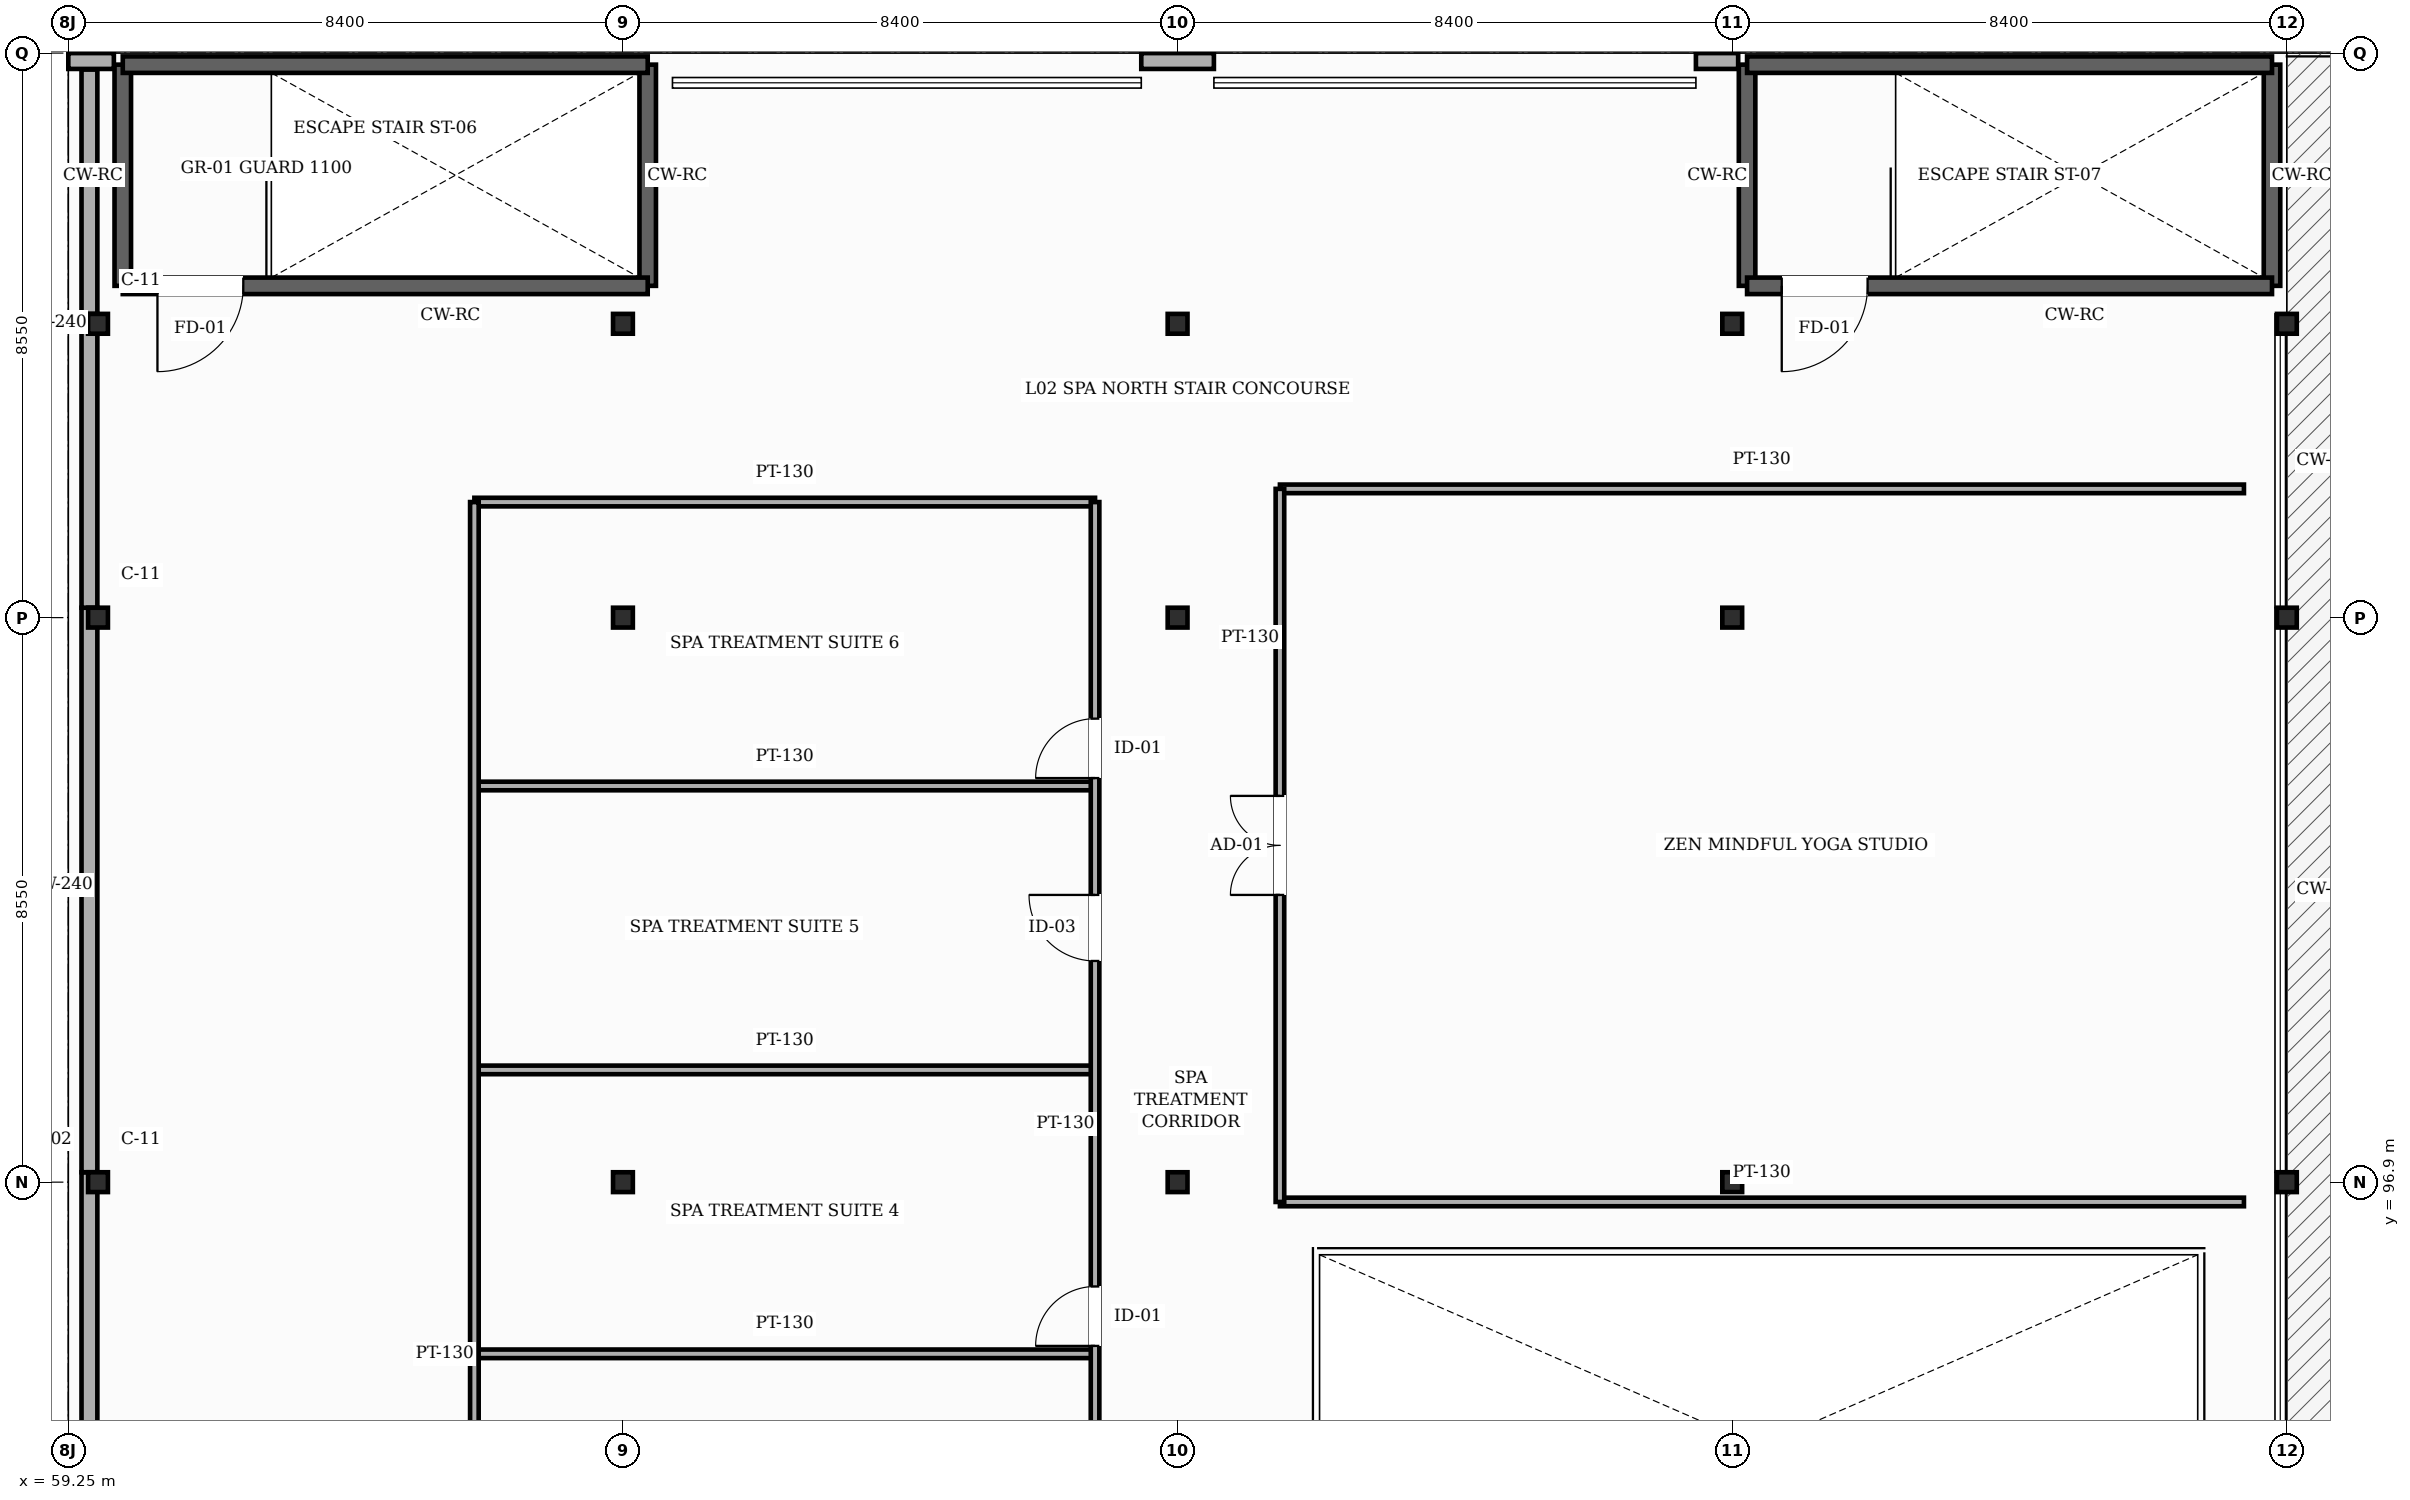
"""IFC4 building model, lengths in metres.
Left out: names, types, materials, properties, quantities, classifications, styles, units other than length and angle.
Written with IfcOpenShell. Run it as: python <this file> out.ifc"""

import sys

from ifc_helpers import new_model, si_unit, direction, frame, frame_2d, origin, origin_2d, place, context, subcontext, project, spatial, rectangle, i_section, extrude, element, fill, save


model = new_model("IFC4")
c1 = context("Model", 3, precision=1e-05, world=origin(), true_north=direction((0.0, 1.0)))
c2 = subcontext(c1, "Body", "Model", "MODEL_VIEW")
j1 = project(units=[si_unit("LENGTHUNIT", "METRE"), si_unit("PLANEANGLEUNIT", "RADIAN")], contexts=[c1])
p1 = place(None, origin())
s1 = spatial("IfcSite", under=j1, at=p1, CompositionType="ELEMENT")
p2 = place(p1, origin())
s2 = spatial("IfcBuilding", under=s1, at=p2, CompositionType="ELEMENT")
p3 = place(p2, frame((0.0, 0.0, 10.2)))
s3 = spatial("IfcBuildingStorey", under=s2, at=p3, CompositionType="ELEMENT", Elevation=10.2)
for number, where, z_axis, x_axis in (
    (1, (59.7, 96.9, 0.0), (0.0, 0.0, 1.0), (1.0, 0.0, 0.0)),
    (2, (59.7, 105.45, 0.0), (0.0, 0.0, 1.0), (1.0, 0.0, 0.0)),
    (3, (59.7, 109.9, 0.0), (0.0, 0.0, 1.0), (1.0, 0.0, 0.0)),
    (4, (67.65, 96.9, 0.0), (0.0, 0.0, 1.0), (1.0, 0.0, 0.0)),
    (5, (67.65, 105.45, 0.0), (0.0, 0.0, 1.0), (1.0, 0.0, 0.0)),
    (6, (67.65, 109.9, 0.0), (0.0, 0.0, 1.0), (1.0, 0.0, 0.0)),
    (7, (76.05, 96.9, 0.0), (0.0, 0.0, 1.0), (1.0, 0.0, 0.0)),
    (8, (76.05, 105.45, 0.0), (0.0, 0.0, 1.0), (1.0, 0.0, 0.0)),
    (9, (76.05, 109.9, 0.0), (0.0, 0.0, 1.0), (1.0, 0.0, 0.0)),
    (10, (84.45, 96.9, 0.0), (0.0, 0.0, 1.0), (1.0, 0.0, 0.0)),
    (11, (84.45, 105.45, 0.0), (0.0, 0.0, 1.0), (1.0, 0.0, 0.0)),
    (12, (84.45, 109.9, 0.0), (0.0, 0.0, 1.0), (1.0, 0.0, 0.0)),
    (13, (92.85, 96.9, 0.0), (0.0, 0.0, 1.0), (1.0, 0.0, 0.0)),
    (14, (92.85, 105.45, 0.0), (0.0, 0.0, 1.0), (1.0, 0.0, 0.0)),
    (15, (92.85, 109.9, 0.0), (0.0, 0.0, 1.0), (1.0, 0.0, 0.0)),
):
    element("IfcColumn", number, at=place(p3, frame(where, z_axis=z_axis, x_axis=x_axis)), inside=s3, PredefinedType="COLUMN", context=c2, shape_type="SweptSolid", body=[
        extrude(i_section(OverallWidth=0.3, OverallDepth=0.3, WebThickness=0.01, FlangeThickness=0.015, FilletRadius=0.013, at=origin_2d()), origin(), (0.0, 0.0, 1.0), 4.8),
    ])
p4 = place(p3, frame((59.25, 113.88, 0.0), z_axis=(0.0, 0.0, 1.0), x_axis=(1.0, 0.0, 0.0)))
e16 = element("IfcWall", 16, at=p4, inside=s3, PredefinedType="SOLIDWALL", context=c2, shape_type="SweptSolid", body=[
    extrude(rectangle(XDim=0.69, YDim=0.24, at=frame_2d((0.345, 0.0))), origin(), (0.0, 0.0, 1.0), 4.545),
])
p5 = place(p3, frame((75.5, 113.88, 0.0), z_axis=(0.0, 0.0, 1.0), x_axis=(1.0, 0.0, 0.0)))
e17 = element("IfcWall", 17, at=p5, inside=s3, PredefinedType="SOLIDWALL", context=c2, shape_type="SweptSolid", body=[
    extrude(rectangle(XDim=1.1, YDim=0.24, at=frame_2d((0.55, 0.0))), origin(), (0.0, 0.0, 1.0), 4.545),
])
p6 = place(p3, frame((83.9, 113.88, 0.0), z_axis=(0.0, 0.0, 1.0), x_axis=(1.0, 0.0, 0.0)))
e18 = element("IfcWall", 18, at=p6, inside=s3, PredefinedType="SOLIDWALL", context=c2, shape_type="SweptSolid", body=[
    extrude(rectangle(XDim=0.64, YDim=0.24, at=frame_2d((0.32, 0.0))), origin(), (0.0, 0.0, 1.0), 4.545),
])
p7 = place(p3, frame((59.57, 89.05, 0.0), z_axis=(0.0, 0.0, 1.0), x_axis=(0.0, 1.0, 0.0)))
e19 = element("IfcWall", 19, at=p7, inside=s3, PredefinedType="SOLIDWALL", context=c2, shape_type="SweptSolid", body=[
    extrude(rectangle(XDim=8.0, YDim=0.24, at=frame_2d((4.0, 0.0))), origin(), (0.0, 0.0, 1.0), 4.545),
])
p8 = place(p3, frame((59.57, 97.05, 0.0), z_axis=(0.0, 0.0, 1.0), x_axis=(0.0, 1.0, 0.0)))
e20 = element("IfcWall", 20, at=p8, inside=s3, PredefinedType="SOLIDWALL", context=c2, shape_type="SweptSolid", body=[
    extrude(rectangle(XDim=8.55, YDim=0.24, at=frame_2d((4.275, 0.0))), origin(), (0.0, 0.0, 1.0), 4.545),
])
p9 = place(p3, frame((59.57, 105.6, 0.0), z_axis=(0.0, 0.0, 1.0), x_axis=(0.0, 1.0, 0.0)))
e21 = element("IfcWall", 21, at=p9, inside=s3, PredefinedType="SOLIDWALL", context=c2, shape_type="SweptSolid", body=[
    extrude(rectangle(XDim=4.45, YDim=0.24, at=frame_2d((2.225, 0.0))), origin(), (0.0, 0.0, 1.0), 4.545),
])
p10 = place(p3, frame((59.57, 110.05, 0.0), z_axis=(0.0, 0.0, 1.0), x_axis=(0.0, 1.0, 0.0)))
e22 = element("IfcWall", 22, at=p10, inside=s3, PredefinedType="SOLIDWALL", context=c2, shape_type="SweptSolid", body=[
    extrude(rectangle(XDim=3.7, YDim=0.24, at=frame_2d((1.85, 0.0))), origin(), (0.0, 0.0, 1.0), 4.545),
])
for number, where, z_axis, x_axis in (
    (23, (60.075, 110.475, 0.0), (0.0, 0.0, 1.0), (0.0, 1.0, 0.0)),
    (24, (68.025, 113.825, 0.0), (0.0, 0.0, 1.0), (0.0, -1.0, 0.0)),
):
    element("IfcWall", number, at=place(p3, frame(where, z_axis=z_axis, x_axis=x_axis)), inside=s3, PredefinedType="SHEAR", context=c2, shape_type="SweptSolid", body=[
        extrude(rectangle(XDim=3.35, YDim=0.25, at=frame_2d((1.675, 0.0))), origin(), (0.0, 0.0, 1.0), 4.56),
    ])
p11 = place(p3, frame((68.025, 110.475, 0.0), z_axis=(0.0, 0.0, 1.0), x_axis=(-1.0, 0.0, 0.0)))
e25 = element("IfcWall", 25, at=p11, inside=s3, PredefinedType="SHEAR", context=c2, shape_type="SweptSolid", body=[
    extrude(rectangle(XDim=7.95, YDim=0.25, at=frame_2d((3.975, 0.0))), origin(), (0.0, 0.0, 1.0), 4.56),
])
p12 = place(p11, frame((6.125, 0.0, 0.0)))
e26 = element("IfcOpeningElement", 26, at=p12, cuts=e25, PredefinedType="OPENING", context=c2, shape_type="SweptSolid", body=[
    extrude(rectangle(XDim=1.3, YDim=2.2, at=frame_2d((0.65, 1.1))), frame((0.0, 0.135, 0.0), z_axis=(0.0, -1.0, 0.0), x_axis=(1.0, 0.0, 0.0)), (0.0, 0.0, 1.0), 0.27),
])
p13 = place(p3, frame((60.075, 113.825, 0.0), z_axis=(0.0, 0.0, 1.0), x_axis=(1.0, 0.0, 0.0)))
e27 = element("IfcWall", 27, at=p13, inside=s3, PredefinedType="SHEAR", context=c2, shape_type="SweptSolid", body=[
    extrude(rectangle(XDim=7.95, YDim=0.25, at=frame_2d((3.975, 0.0))), origin(), (0.0, 0.0, 1.0), 4.56),
])
for number, where, z_axis, x_axis in (
    (28, (84.675, 110.475, 0.0), (0.0, 0.0, 1.0), (0.0, 1.0, 0.0)),
    (29, (92.625, 113.825, 0.0), (0.0, 0.0, 1.0), (0.0, -1.0, 0.0)),
):
    element("IfcWall", number, at=place(p3, frame(where, z_axis=z_axis, x_axis=x_axis)), inside=s3, PredefinedType="SHEAR", context=c2, shape_type="SweptSolid", body=[
        extrude(rectangle(XDim=3.35, YDim=0.25, at=frame_2d((1.675, 0.0))), origin(), (0.0, 0.0, 1.0), 4.56),
    ])
p14 = place(p3, frame((92.625, 110.475, 0.0), z_axis=(0.0, 0.0, 1.0), x_axis=(-1.0, 0.0, 0.0)))
e30 = element("IfcWall", 30, at=p14, inside=s3, PredefinedType="SHEAR", context=c2, shape_type="SweptSolid", body=[
    extrude(rectangle(XDim=7.95, YDim=0.25, at=frame_2d((3.975, 0.0))), origin(), (0.0, 0.0, 1.0), 4.56),
])
p15 = place(p14, frame((6.125, 0.0, 0.0)))
e31 = element("IfcOpeningElement", 31, at=p15, cuts=e30, PredefinedType="OPENING", context=c2, shape_type="SweptSolid", body=[
    extrude(rectangle(XDim=1.3, YDim=2.2, at=frame_2d((0.65, 1.1))), frame((0.0, 0.135, 0.0), z_axis=(0.0, -1.0, 0.0), x_axis=(1.0, 0.0, 0.0)), (0.0, 0.0, 1.0), 0.27),
])
p16 = place(p3, frame((84.675, 113.825, 0.0), z_axis=(0.0, 0.0, 1.0), x_axis=(1.0, 0.0, 0.0)))
e32 = element("IfcWall", 32, at=p16, inside=s3, PredefinedType="SHEAR", context=c2, shape_type="SweptSolid", body=[
    extrude(rectangle(XDim=7.95, YDim=0.25, at=frame_2d((3.975, 0.0))), origin(), (0.0, 0.0, 1.0), 4.56),
])
p17 = place(p3, frame((65.4, 94.3, 0.0), z_axis=(0.0, 0.0, 1.0), x_axis=(1.0, 0.0, 0.0)))
e33 = element("IfcWall", 33, at=p17, inside=s3, PredefinedType="PARTITIONING", context=c2, shape_type="SweptSolid", body=[
    extrude(rectangle(XDim=9.4, YDim=0.13, at=frame_2d((4.7, 0.0))), origin(), (0.0, 0.0, 1.0), 4.545),
])
p18 = place(p3, frame((77.6, 96.6, 0.0), z_axis=(0.0, 0.0, 1.0), x_axis=(1.0, 0.0, 0.0)))
e34 = element("IfcWall", 34, at=p18, inside=s3, PredefinedType="PARTITIONING", context=c2, shape_type="SweptSolid", body=[
    extrude(rectangle(XDim=14.6, YDim=0.13, at=frame_2d((7.3, 0.0))), origin(), (0.0, 0.0, 1.0), 4.545),
])
for number, where, z_axis, x_axis in (
    (35, (65.4, 98.6, 0.0), (0.0, 0.0, 1.0), (1.0, 0.0, 0.0)),
    (36, (65.4, 102.9, 0.0), (0.0, 0.0, 1.0), (1.0, 0.0, 0.0)),
    (37, (65.4, 107.2, 0.0), (0.0, 0.0, 1.0), (1.0, 0.0, 0.0)),
):
    element("IfcWall", number, at=place(p3, frame(where, z_axis=z_axis, x_axis=x_axis)), inside=s3, PredefinedType="PARTITIONING", context=c2, shape_type="SweptSolid", body=[
        extrude(rectangle(XDim=9.4, YDim=0.13, at=frame_2d((4.7, 0.0))), origin(), (0.0, 0.0, 1.0), 4.545),
    ])
p19 = place(p3, frame((77.6, 107.4, 0.0), z_axis=(0.0, 0.0, 1.0), x_axis=(1.0, 0.0, 0.0)))
e38 = element("IfcWall", 38, at=p19, inside=s3, PredefinedType="PARTITIONING", context=c2, shape_type="SweptSolid", body=[
    extrude(rectangle(XDim=14.6, YDim=0.13, at=frame_2d((7.3, 0.0))), origin(), (0.0, 0.0, 1.0), 4.545),
])
p20 = place(p3, frame((65.4, 81.4, 0.0), z_axis=(0.0, 0.0, 1.0), x_axis=(0.0, 1.0, 0.0)))
e39 = element("IfcWall", 39, at=p20, inside=s3, PredefinedType="PARTITIONING", context=c2, shape_type="SweptSolid", body=[
    extrude(rectangle(XDim=25.8, YDim=0.13, at=frame_2d((12.9, 0.0))), origin(), (0.0, 0.0, 1.0), 4.545),
])
p21 = place(p3, frame((74.8, 81.4, 0.0), z_axis=(0.0, 0.0, 1.0), x_axis=(0.0, 1.0, 0.0)))
e40 = element("IfcWall", 40, at=p21, inside=s3, PredefinedType="PARTITIONING", context=c2, shape_type="SweptSolid", body=[
    extrude(rectangle(XDim=25.8, YDim=0.13, at=frame_2d((12.9, 0.0))), origin(), (0.0, 0.0, 1.0), 4.545),
])
p22 = place(p21, frame((1.65, 0.0, 0.0)))
e41 = element("IfcOpeningElement", 41, at=p22, cuts=e40, PredefinedType="OPENING", context=c2, shape_type="SweptSolid", body=[
    extrude(rectangle(XDim=1.0, YDim=2.18, at=frame_2d((0.5, 1.09))), frame((0.0, 0.075, 0.0), z_axis=(0.0, -1.0, 0.0), x_axis=(1.0, 0.0, 0.0)), (0.0, 0.0, 1.0), 0.15),
])
p23 = place(p21, frame((6.0, 0.0, 0.0)))
e42 = element("IfcOpeningElement", 42, at=p23, cuts=e40, PredefinedType="OPENING", context=c2, shape_type="SweptSolid", body=[
    extrude(rectangle(XDim=0.9, YDim=2.15, at=frame_2d((0.45, 1.075))), frame((0.0, 0.075, 0.0), z_axis=(0.0, -1.0, 0.0), x_axis=(1.0, 0.0, 0.0)), (0.0, 0.0, 1.0), 0.15),
])
p24 = place(p21, frame((10.25, 0.0, 0.0)))
e43 = element("IfcOpeningElement", 43, at=p24, cuts=e40, PredefinedType="OPENING", context=c2, shape_type="SweptSolid", body=[
    extrude(rectangle(XDim=1.0, YDim=2.18, at=frame_2d((0.5, 1.09))), frame((0.0, 0.075, 0.0), z_axis=(0.0, -1.0, 0.0), x_axis=(1.0, 0.0, 0.0)), (0.0, 0.0, 1.0), 0.15),
])
p25 = place(p21, frame((13.02, 0.0, 0.0)))
e44 = element("IfcOpeningElement", 44, at=p25, cuts=e40, PredefinedType="OPENING", context=c2, shape_type="SweptSolid", body=[
    extrude(rectangle(XDim=0.9, YDim=2.15, at=frame_2d((0.45, 1.075))), frame((0.0, 0.075, 0.0), z_axis=(0.0, -1.0, 0.0), x_axis=(1.0, 0.0, 0.0)), (0.0, 0.0, 1.0), 0.15),
])
p26 = place(p21, frame((18.85, 0.0, 0.0)))
e45 = element("IfcOpeningElement", 45, at=p26, cuts=e40, PredefinedType="OPENING", context=c2, shape_type="SweptSolid", body=[
    extrude(rectangle(XDim=1.0, YDim=2.18, at=frame_2d((0.5, 1.09))), frame((0.0, 0.075, 0.0), z_axis=(0.0, -1.0, 0.0), x_axis=(1.0, 0.0, 0.0)), (0.0, 0.0, 1.0), 0.15),
])
p27 = place(p21, frame((21.62, 0.0, 0.0)))
e46 = element("IfcOpeningElement", 46, at=p27, cuts=e40, PredefinedType="OPENING", context=c2, shape_type="SweptSolid", body=[
    extrude(rectangle(XDim=0.9, YDim=2.15, at=frame_2d((0.45, 1.075))), frame((0.0, 0.075, 0.0), z_axis=(0.0, -1.0, 0.0), x_axis=(1.0, 0.0, 0.0)), (0.0, 0.0, 1.0), 0.15),
])
p28 = place(p3, frame((77.6, 96.6, 0.0), z_axis=(0.0, 0.0, 1.0), x_axis=(0.0, 1.0, 0.0)))
e47 = element("IfcWall", 47, at=p28, inside=s3, PredefinedType="PARTITIONING", context=c2, shape_type="SweptSolid", body=[
    extrude(rectangle(XDim=10.8, YDim=0.13, at=frame_2d((5.4, 0.0))), origin(), (0.0, 0.0, 1.0), 4.545),
])
p29 = place(p28, frame((4.65, 0.0, 0.0)))
e48 = element("IfcOpeningElement", 48, at=p29, cuts=e47, PredefinedType="OPENING", context=c2, shape_type="SweptSolid", body=[
    extrude(rectangle(XDim=1.5, YDim=2.3, at=frame_2d((0.75, 1.15))), frame((0.0, 0.075, 0.0), z_axis=(0.0, -1.0, 0.0), x_axis=(1.0, 0.0, 0.0)), (0.0, 0.0, 1.0), 0.15),
])
p30 = place(p12, origin())
e49 = element("IfcDoor", 49, at=p30, inside=s3, OperationType="SINGLE_SWING_RIGHT", PredefinedType="DOOR", context=c2, shape_type="SweptSolid", body=[
    extrude(rectangle(XDim=1.3, YDim=2.2, at=frame_2d((0.65, 1.1))), frame((0.0, 0.025, 0.0), z_axis=(0.0, -1.0, 0.0), x_axis=(1.0, 0.0, 0.0)), (0.0, 0.0, 1.0), 0.05),
])
fill(e26, e49)
p31 = place(p15, origin())
e50 = element("IfcDoor", 50, at=p31, inside=s3, OperationType="SINGLE_SWING_RIGHT", PredefinedType="DOOR", context=c2, shape_type="SweptSolid", body=[
    extrude(rectangle(XDim=1.3, YDim=2.2, at=frame_2d((0.65, 1.1))), frame((0.0, 0.025, 0.0), z_axis=(0.0, -1.0, 0.0), x_axis=(1.0, 0.0, 0.0)), (0.0, 0.0, 1.0), 0.05),
])
fill(e31, e50)
p32 = place(p29, origin())
e51 = element("IfcDoor", 51, at=p32, inside=s3, OperationType="DOUBLE_DOOR_SINGLE_SWING", PredefinedType="DOOR", context=c2, shape_type="SweptSolid", body=[
    extrude(rectangle(XDim=1.5, YDim=2.3, at=frame_2d((0.75, 1.15))), frame((0.0, 0.025, 0.0), z_axis=(0.0, -1.0, 0.0), x_axis=(1.0, 0.0, 0.0)), (0.0, 0.0, 1.0), 0.05),
])
fill(e48, e51)
p33 = place(p25, origin())
e52 = element("IfcDoor", 52, at=p33, inside=s3, OperationType="SINGLE_SWING_LEFT", PredefinedType="DOOR", context=c2, shape_type="SweptSolid", body=[
    extrude(rectangle(XDim=0.9, YDim=2.15, at=frame_2d((0.45, 1.075))), frame((0.0, 0.025, 0.0), z_axis=(0.0, -1.0, 0.0), x_axis=(1.0, 0.0, 0.0)), (0.0, 0.0, 1.0), 0.05),
])
fill(e44, e52)
p34 = place(p26, origin())
e53 = element("IfcDoor", 53, at=p34, inside=s3, OperationType="SINGLE_SWING_RIGHT", PredefinedType="DOOR", context=c2, shape_type="SweptSolid", body=[
    extrude(rectangle(XDim=1.0, YDim=2.18, at=frame_2d((0.5, 1.09))), frame((0.0, 0.025, 0.0), z_axis=(0.0, -1.0, 0.0), x_axis=(1.0, 0.0, 0.0)), (0.0, 0.0, 1.0), 0.05),
])
fill(e45, e53)
p35 = place(p27, origin())
e54 = element("IfcDoor", 54, at=p35, inside=s3, OperationType="SINGLE_SWING_LEFT", PredefinedType="DOOR", context=c2, shape_type="SweptSolid", body=[
    extrude(rectangle(XDim=0.9, YDim=2.15, at=frame_2d((0.45, 1.075))), frame((0.0, 0.025, 0.0), z_axis=(0.0, -1.0, 0.0), x_axis=(1.0, 0.0, 0.0)), (0.0, 0.0, 1.0), 0.05),
])
fill(e46, e54)
save(model, sys.argv[1])
